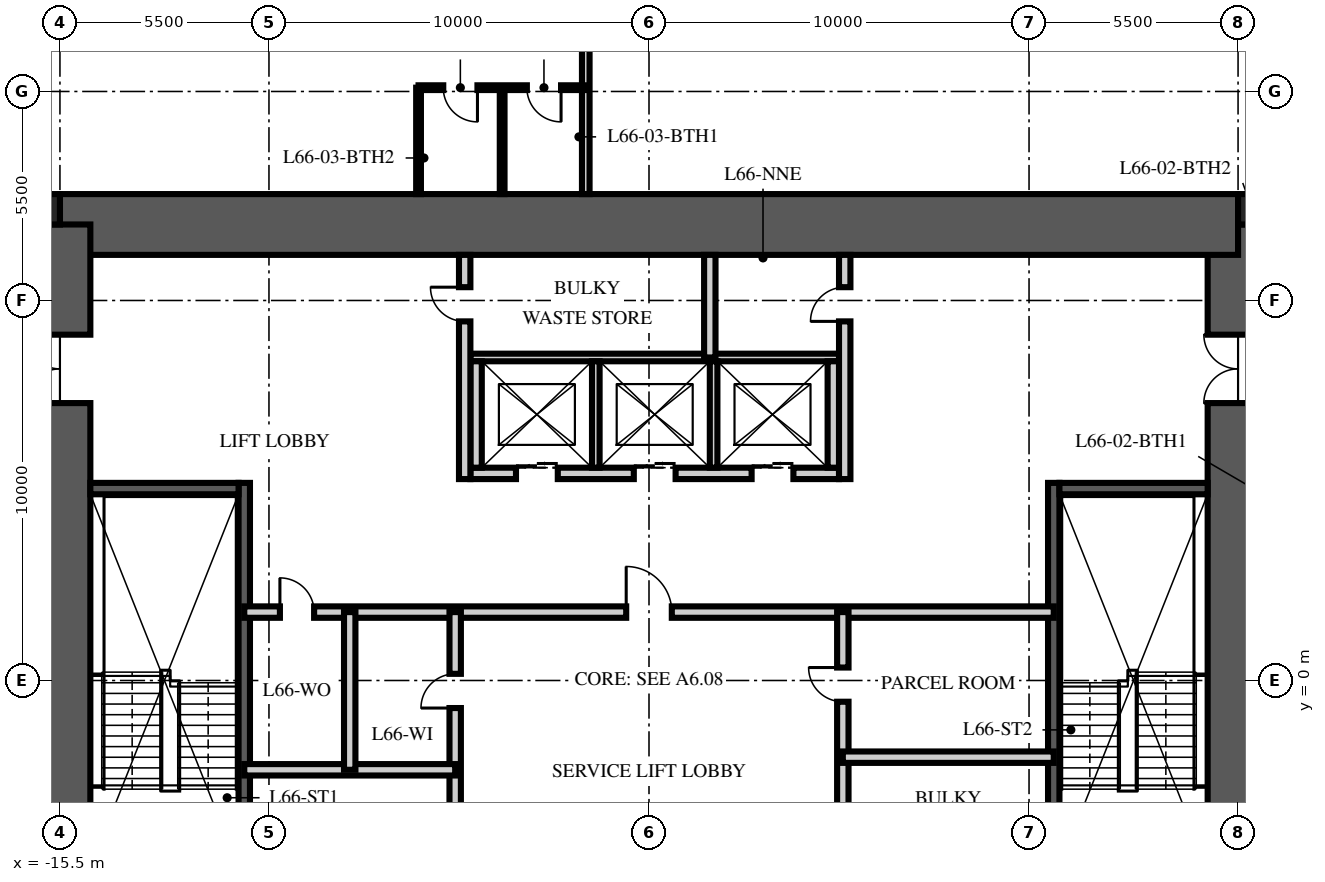
"""IFC4 building model, lengths in metres.
Left out: names, types, materials, properties, quantities, classifications, styles, units other than length and angle.
Written with IfcOpenShell. Run it as: python <this file> out.ifc"""

import sys

from ifc_helpers import new_model, si_unit, direction, frame, frame_2d, origin, origin_2d, place, context, subcontext, project, spatial, rectangle, extrude, element, fill, save


model = new_model("IFC4")
c1 = context("Model", 3, precision=1e-05, world=origin(), true_north=direction((0.0, 1.0)))
c2 = subcontext(c1, "Body", "Model", "MODEL_VIEW")
j1 = project(units=[si_unit("LENGTHUNIT", "METRE"), si_unit("PLANEANGLEUNIT", "RADIAN")], contexts=[c1])
p1 = place(None, origin())
s1 = spatial("IfcSite", under=j1, at=p1, CompositionType="ELEMENT")
p2 = place(p1, origin())
s2 = spatial("IfcBuilding", under=s1, at=p2, CompositionType="ELEMENT")
p3 = place(p2, frame((0.0, 0.0, 263.25)))
s3 = spatial("IfcBuildingStorey", under=s2, at=p3, CompositionType="ELEMENT", Elevation=263.25)
p4 = place(p3, frame((15.5, -12.0, -0.25), z_axis=(0.0, 0.0, 1.0), x_axis=(0.0, 1.0, 0.0)))
e1 = element("IfcWall", 1, at=p4, inside=s3, PredefinedType="SHEAR", context=c2, shape_type="SweptSolid", body=[
    extrude(rectangle(XDim=24.0, YDim=1.6, at=frame_2d((12.0, 0.0))), origin(), (0.0, 0.0, 1.0), 3.75),
])
p5 = place(p4, frame((3.2, 0.0, 0.25)))
e2 = element("IfcOpeningElement", 2, at=p5, cuts=e1, PredefinedType="OPENING", context=c2, shape_type="SweptSolid", body=[
    extrude(rectangle(XDim=1.2, YDim=2.1, at=frame_2d((0.6, 1.05))), frame((0.0, 0.81, 0.0), z_axis=(0.0, -1.0, 0.0), x_axis=(1.0, 0.0, 0.0)), (0.0, 0.0, 1.0), 1.62),
])
p6 = place(p4, frame((19.3, 0.0, 0.25)))
e3 = element("IfcOpeningElement", 3, at=p6, cuts=e1, PredefinedType="OPENING", context=c2, shape_type="SweptSolid", body=[
    extrude(rectangle(XDim=1.8, YDim=2.1, at=frame_2d((0.9, 1.05))), frame((0.0, 0.81, 0.0), z_axis=(0.0, -1.0, 0.0), x_axis=(1.0, 0.0, 0.0)), (0.0, 0.0, 1.0), 1.62),
])
p7 = place(p3, frame((-15.5, 12.0, -0.25), z_axis=(0.0, 0.0, 1.0), x_axis=(1.0, 0.0, 0.0)))
e4 = element("IfcWall", 4, at=p7, inside=s3, PredefinedType="SHEAR", context=c2, shape_type="SweptSolid", body=[
    extrude(rectangle(XDim=31.0, YDim=1.6, at=frame_2d((15.5, 0.0))), origin(), (0.0, 0.0, 1.0), 3.75),
])
p8 = place(p3, frame((-15.5, -12.0, -0.25), z_axis=(0.0, 0.0, 1.0), x_axis=(0.0, 1.0, 0.0)))
e5 = element("IfcWall", 5, at=p8, inside=s3, PredefinedType="SHEAR", context=c2, shape_type="SweptSolid", body=[
    extrude(rectangle(XDim=24.0, YDim=1.6, at=frame_2d((12.0, 0.0))), origin(), (0.0, 0.0, 1.0), 3.75),
])
p9 = place(p8, frame((3.2, 0.0, 0.25)))
e6 = element("IfcOpeningElement", 6, at=p9, cuts=e5, PredefinedType="OPENING", context=c2, shape_type="SweptSolid", body=[
    extrude(rectangle(XDim=1.2, YDim=2.1, at=frame_2d((0.6, 1.05))), frame((0.0, 0.81, 0.0), z_axis=(0.0, -1.0, 0.0), x_axis=(1.0, 0.0, 0.0)), (0.0, 0.0, 1.0), 1.62),
])
p10 = place(p8, frame((19.3, 0.0, 0.25)))
e7 = element("IfcOpeningElement", 7, at=p10, cuts=e5, PredefinedType="OPENING", context=c2, shape_type="SweptSolid", body=[
    extrude(rectangle(XDim=1.8, YDim=2.1, at=frame_2d((0.9, 1.05))), frame((0.0, 0.81, 0.0), z_axis=(0.0, -1.0, 0.0), x_axis=(1.0, 0.0, 0.0)), (0.0, 0.0, 1.0), 1.62),
])
for number, where, z_axis, x_axis in (
    (8, (15.9, 12.4, -0.25), (0.0, 0.0, 1.0), (1.0, 0.0, 0.0)),
    (9, (-15.9, 12.4, -0.25), (0.0, 0.0, 1.0), (1.0, 0.0, 0.0)),
):
    element("IfcColumn", number, at=place(p3, frame(where, z_axis=z_axis, x_axis=x_axis)), inside=s3, PredefinedType="COLUMN", context=c2, shape_type="SweptSolid", body=[
        extrude(rectangle(XDim=0.8, YDim=0.8, at=origin_2d()), origin(), (0.0, 0.0, 1.0), 3.75),
    ])
p11 = place(p3, frame((-10.65, -4.9, 0.0), z_axis=(0.0, 0.0, 1.0), x_axis=(0.0, 1.0, 0.0)))
e10 = element("IfcWall", 10, at=p11, inside=s3, PredefinedType="SOLIDWALL", context=c2, shape_type="SweptSolid", body=[
    extrude(rectangle(XDim=10.1, YDim=0.3, at=frame_2d((5.05, 0.0))), origin(), (0.0, 0.0, 1.0), 3.5),
])
p12 = place(p3, frame((-14.7, 5.05, 0.0), z_axis=(0.0, 0.0, 1.0), x_axis=(1.0, 0.0, 0.0)))
e11 = element("IfcWall", 11, at=p12, inside=s3, PredefinedType="SOLIDWALL", context=c2, shape_type="SweptSolid", body=[
    extrude(rectangle(XDim=3.9, YDim=0.3, at=frame_2d((1.95, 0.0))), origin(), (0.0, 0.0, 1.0), 3.5),
])
p13 = place(p3, frame((10.65, -4.9, 0.0), z_axis=(0.0, 0.0, 1.0), x_axis=(0.0, 1.0, 0.0)))
e12 = element("IfcWall", 12, at=p13, inside=s3, PredefinedType="SOLIDWALL", context=c2, shape_type="SweptSolid", body=[
    extrude(rectangle(XDim=10.1, YDim=0.3, at=frame_2d((5.05, 0.0))), origin(), (0.0, 0.0, 1.0), 3.5),
])
p14 = place(p3, frame((14.7, 5.05, 0.0), z_axis=(0.0, 0.0, 1.0), x_axis=(-1.0, 0.0, 0.0)))
e13 = element("IfcWall", 13, at=p14, inside=s3, PredefinedType="SOLIDWALL", context=c2, shape_type="SweptSolid", body=[
    extrude(rectangle(XDim=3.9, YDim=0.3, at=frame_2d((1.95, 0.0))), origin(), (0.0, 0.0, 1.0), 3.5),
])
p15 = place(p3, frame((-4.7, 5.45, 0.0), z_axis=(0.0, 0.0, 1.0), x_axis=(1.0, 0.0, 0.0)))
e14 = element("IfcWall", 14, at=p15, inside=s3, PredefinedType="PARTITIONING", context=c2, shape_type="SweptSolid", body=[
    extrude(rectangle(XDim=9.7, YDim=0.3, at=frame_2d((4.85, 0.0))), origin(), (0.0, 0.0, 1.0), 3.5),
])
p16 = place(p15, frame((1.2, 0.0, 0.0)))
e15 = element("IfcOpeningElement", 15, at=p16, cuts=e14, PredefinedType="OPENING", context=c2, shape_type="SweptSolid", body=[
    extrude(rectangle(XDim=1.1, YDim=2.1, at=frame_2d((0.55, 1.05))), frame((0.0, 0.16, 0.0), z_axis=(0.0, -1.0, 0.0), x_axis=(1.0, 0.0, 0.0)), (0.0, 0.0, 1.0), 0.32),
])
p17 = place(p15, frame((4.3, 0.0, 0.0)))
e16 = element("IfcOpeningElement", 16, at=p17, cuts=e14, PredefinedType="OPENING", context=c2, shape_type="SweptSolid", body=[
    extrude(rectangle(XDim=1.1, YDim=2.1, at=frame_2d((0.55, 1.05))), frame((0.0, 0.16, 0.0), z_axis=(0.0, -1.0, 0.0), x_axis=(1.0, 0.0, 0.0)), (0.0, 0.0, 1.0), 0.32),
])
p18 = place(p15, frame((7.4, 0.0, 0.0)))
e17 = element("IfcOpeningElement", 17, at=p18, cuts=e14, PredefinedType="OPENING", context=c2, shape_type="SweptSolid", body=[
    extrude(rectangle(XDim=1.1, YDim=2.1, at=frame_2d((0.55, 1.05))), frame((0.0, 0.16, 0.0), z_axis=(0.0, -1.0, 0.0), x_axis=(1.0, 0.0, 0.0)), (0.0, 0.0, 1.0), 0.32),
])
p19 = place(p3, frame((-4.7, 8.5, 0.0), z_axis=(0.0, 0.0, 1.0), x_axis=(1.0, 0.0, 0.0)))
e18 = element("IfcWall", 18, at=p19, inside=s3, PredefinedType="PARTITIONING", context=c2, shape_type="SweptSolid", body=[
    extrude(rectangle(XDim=9.7, YDim=0.2, at=frame_2d((4.85, 0.0))), origin(), (0.0, 0.0, 1.0), 3.5),
])
for number, where, z_axis, x_axis in (
    (19, (-4.55, 5.6, 0.0), (0.0, 0.0, 1.0), (0.0, 1.0, 0.0)),
    (20, (4.85, 5.6, 0.0), (0.0, 0.0, 1.0), (0.0, 1.0, 0.0)),
):
    element("IfcWall", number, at=place(p3, frame(where, z_axis=z_axis, x_axis=x_axis)), inside=s3, PredefinedType="PARTITIONING", context=c2, shape_type="SweptSolid", body=[
        extrude(rectangle(XDim=2.8, YDim=0.3, at=frame_2d((1.4, 0.0))), origin(), (0.0, 0.0, 1.0), 3.5),
    ])
for number, where, z_axis, x_axis in (
    (21, (-1.4, 5.6, 0.0), (0.0, 0.0, 1.0), (0.0, 1.0, 0.0)),
    (22, (1.7, 5.6, 0.0), (0.0, 0.0, 1.0), (0.0, 1.0, 0.0)),
):
    element("IfcWall", number, at=place(p3, frame(where, z_axis=z_axis, x_axis=x_axis)), inside=s3, PredefinedType="PARTITIONING", context=c2, shape_type="SweptSolid", body=[
        extrude(rectangle(XDim=2.8, YDim=0.2, at=frame_2d((1.4, 0.0))), origin(), (0.0, 0.0, 1.0), 3.5),
    ])
p20 = place(p3, frame((-10.65, 1.8, 0.0), z_axis=(0.0, 0.0, 1.0), x_axis=(1.0, 0.0, 0.0)))
e23 = element("IfcWall", 23, at=p20, inside=s3, PredefinedType="PARTITIONING", context=c2, shape_type="SweptSolid", body=[
    extrude(rectangle(XDim=21.3, YDim=0.3, at=frame_2d((10.65, 0.0))), origin(), (0.0, 0.0, 1.0), 3.5),
])
p21 = place(p20, frame((10.05, 0.0, 0.0)))
e24 = element("IfcOpeningElement", 24, at=p21, cuts=e23, PredefinedType="OPENING", context=c2, shape_type="SweptSolid", body=[
    extrude(rectangle(XDim=1.2, YDim=2.1, at=frame_2d((0.6, 1.05))), frame((0.0, 0.16, 0.0), z_axis=(0.0, -1.0, 0.0), x_axis=(1.0, 0.0, 0.0)), (0.0, 0.0, 1.0), 0.32),
])
p22 = place(p20, frame((0.938, 0.0, 0.0)))
e25 = element("IfcOpeningElement", 25, at=p22, cuts=e23, PredefinedType="OPENING", context=c2, shape_type="SweptSolid", body=[
    extrude(rectangle(XDim=0.9, YDim=2.1, at=frame_2d((0.45, 1.05))), frame((0.0, 0.16, 0.0), z_axis=(0.0, -1.0, 0.0), x_axis=(1.0, 0.0, 0.0)), (0.0, 0.0, 1.0), 0.32),
])
p23 = place(p3, frame((-5.1, -6.65, 0.0), z_axis=(0.0, 0.0, 1.0), x_axis=(0.0, 1.0, 0.0)))
e26 = element("IfcWall", 26, at=p23, inside=s3, PredefinedType="PARTITIONING", context=c2, shape_type="SweptSolid", body=[
    extrude(rectangle(XDim=8.45, YDim=0.3, at=frame_2d((4.225, 0.0))), origin(), (0.0, 0.0, 1.0), 3.5),
])
p24 = place(p23, frame((1.7, 0.0, 0.0)))
e27 = element("IfcOpeningElement", 27, at=p24, cuts=e26, PredefinedType="OPENING", context=c2, shape_type="SweptSolid", body=[
    extrude(rectangle(XDim=0.9, YDim=2.1, at=frame_2d((0.45, 1.05))), frame((0.0, 0.16, 0.0), z_axis=(0.0, -1.0, 0.0), x_axis=(1.0, 0.0, 0.0)), (0.0, 0.0, 1.0), 0.32),
])
p25 = place(p23, frame((5.925, 0.0, 0.0)))
e28 = element("IfcOpeningElement", 28, at=p25, cuts=e26, PredefinedType="OPENING", context=c2, shape_type="SweptSolid", body=[
    extrude(rectangle(XDim=0.9, YDim=2.1, at=frame_2d((0.45, 1.05))), frame((0.0, 0.16, 0.0), z_axis=(0.0, -1.0, 0.0), x_axis=(1.0, 0.0, 0.0)), (0.0, 0.0, 1.0), 0.32),
])
p26 = place(p3, frame((5.1, -6.65, 0.0), z_axis=(0.0, 0.0, 1.0), x_axis=(0.0, 1.0, 0.0)))
e29 = element("IfcWall", 29, at=p26, inside=s3, PredefinedType="PARTITIONING", context=c2, shape_type="SweptSolid", body=[
    extrude(rectangle(XDim=8.45, YDim=0.3, at=frame_2d((4.225, 0.0))), origin(), (0.0, 0.0, 1.0), 3.5),
])
p27 = place(p26, frame((1.866, 0.0, 0.0)))
e30 = element("IfcOpeningElement", 30, at=p27, cuts=e29, PredefinedType="OPENING", context=c2, shape_type="SweptSolid", body=[
    extrude(rectangle(XDim=0.9, YDim=2.1, at=frame_2d((0.45, 1.05))), frame((0.0, 0.16, 0.0), z_axis=(0.0, -1.0, 0.0), x_axis=(1.0, 0.0, 0.0)), (0.0, 0.0, 1.0), 0.32),
])
p28 = place(p26, frame((6.091, 0.0, 0.0)))
e31 = element("IfcOpeningElement", 31, at=p28, cuts=e29, PredefinedType="OPENING", context=c2, shape_type="SweptSolid", body=[
    extrude(rectangle(XDim=0.9, YDim=2.1, at=frame_2d((0.45, 1.05))), frame((0.0, 0.16, 0.0), z_axis=(0.0, -1.0, 0.0), x_axis=(1.0, 0.0, 0.0)), (0.0, 0.0, 1.0), 0.32),
])
p29 = place(p3, frame((-10.65, -2.35, 0.0), z_axis=(0.0, 0.0, 1.0), x_axis=(1.0, 0.0, 0.0)))
e32 = element("IfcWall", 32, at=p29, inside=s3, PredefinedType="PARTITIONING", context=c2, shape_type="SweptSolid", body=[
    extrude(rectangle(XDim=5.55, YDim=0.3, at=frame_2d((2.775, 0.0))), origin(), (0.0, 0.0, 1.0), 3.5),
])
p30 = place(p3, frame((-7.875, -2.35, 0.0), z_axis=(0.0, 0.0, 1.0), x_axis=(0.0, 1.0, 0.0)))
e33 = element("IfcWall", 33, at=p30, inside=s3, PredefinedType="PARTITIONING", context=c2, shape_type="SweptSolid", body=[
    extrude(rectangle(XDim=4.15, YDim=0.3, at=frame_2d((2.075, 0.0))), origin(), (0.0, 0.0, 1.0), 3.5),
])
p31 = place(p3, frame((10.65, -2.018, 0.0), z_axis=(0.0, 0.0, 1.0), x_axis=(-1.0, 0.0, 0.0)))
e34 = element("IfcWall", 34, at=p31, inside=s3, PredefinedType="PARTITIONING", context=c2, shape_type="SweptSolid", body=[
    extrude(rectangle(XDim=5.55, YDim=0.3, at=frame_2d((2.775, 0.0))), origin(), (0.0, 0.0, 1.0), 3.5),
])
p32 = place(p3, frame((-4.85, 5.3, 0.0), z_axis=(0.0, 0.0, 1.0), x_axis=(0.0, 1.0, 0.0)))
e35 = element("IfcWall", 35, at=p32, inside=s3, PredefinedType="PARTITIONING", context=c2, shape_type="SweptSolid", body=[
    extrude(rectangle(XDim=5.9, YDim=0.3, at=frame_2d((2.95, 0.0))), origin(), (0.0, 0.0, 1.0), 3.5),
])
p33 = place(p32, frame((4.15, 0.0, 0.0)))
e36 = element("IfcOpeningElement", 36, at=p33, cuts=e35, PredefinedType="OPENING", context=c2, shape_type="SweptSolid", body=[
    extrude(rectangle(XDim=0.9, YDim=2.1, at=frame_2d((0.45, 1.05))), frame((0.0, 0.16, 0.0), z_axis=(0.0, -1.0, 0.0), x_axis=(1.0, 0.0, 0.0)), (0.0, 0.0, 1.0), 0.32),
])
p34 = place(p3, frame((5.15, 5.3, 0.0), z_axis=(0.0, 0.0, 1.0), x_axis=(0.0, 1.0, 0.0)))
e37 = element("IfcWall", 37, at=p34, inside=s3, PredefinedType="PARTITIONING", context=c2, shape_type="SweptSolid", body=[
    extrude(rectangle(XDim=5.9, YDim=0.3, at=frame_2d((2.95, 0.0))), origin(), (0.0, 0.0, 1.0), 3.5),
])
p35 = place(p34, frame((4.15, 0.0, 0.0)))
e38 = element("IfcOpeningElement", 38, at=p35, cuts=e37, PredefinedType="OPENING", context=c2, shape_type="SweptSolid", body=[
    extrude(rectangle(XDim=0.9, YDim=2.1, at=frame_2d((0.45, 1.05))), frame((0.0, 0.16, 0.0), z_axis=(0.0, -1.0, 0.0), x_axis=(1.0, 0.0, 0.0)), (0.0, 0.0, 1.0), 0.32),
])
p36 = place(p3, frame((1.6, 8.5, 0.0), z_axis=(0.0, 0.0, 1.0), x_axis=(0.0, 1.0, 0.0)))
e39 = element("IfcWall", 39, at=p36, inside=s3, PredefinedType="PARTITIONING", context=c2, shape_type="SweptSolid", body=[
    extrude(rectangle(XDim=2.7, YDim=0.3, at=frame_2d((1.35, 0.0))), origin(), (0.0, 0.0, 1.0), 3.5),
])
p37 = place(p3, frame((-1.664, 12.8, 0.0), z_axis=(0.0, 0.0, 1.0), x_axis=(0.0, 1.0, 0.0)))
e40 = element("IfcWall", 40, at=p37, inside=s3, PredefinedType="PARTITIONING", context=c2, shape_type="SweptSolid", body=[
    extrude(rectangle(XDim=12.65, YDim=0.2, at=frame_2d((6.325, 0.0))), origin(), (0.0, 0.0, 1.0), 2.91),
])
p38 = place(p3, frame((-1.664, 15.6, 0.0), z_axis=(0.0, 0.0, 1.0), x_axis=(-1.0, 0.0, 0.0)))
e41 = element("IfcWall", 41, at=p38, inside=s3, PredefinedType="PARTITIONING", context=c2, shape_type="SweptSolid", body=[
    extrude(rectangle(XDim=4.4, YDim=0.125, at=frame_2d((2.2, 0.0))), origin(), (0.0, 0.0, 1.0), 2.81),
])
p39 = place(p38, frame((0.65, 0.0, 0.0)))
e42 = element("IfcOpeningElement", 42, at=p39, cuts=e41, PredefinedType="OPENING", context=c2, shape_type="SweptSolid", body=[
    extrude(rectangle(XDim=0.9, YDim=2.1, at=frame_2d((0.45, 1.05))), frame((0.0, 0.073, 0.0), z_axis=(0.0, -1.0, 0.0), x_axis=(1.0, 0.0, 0.0)), (0.0, 0.0, 1.0), 0.145),
])
p40 = place(p38, frame((2.85, 0.0, 0.0)))
e43 = element("IfcOpeningElement", 43, at=p40, cuts=e41, PredefinedType="OPENING", context=c2, shape_type="SweptSolid", body=[
    extrude(rectangle(XDim=0.9, YDim=2.1, at=frame_2d((0.45, 1.05))), frame((0.0, 0.073, 0.0), z_axis=(0.0, -1.0, 0.0), x_axis=(1.0, 0.0, 0.0)), (0.0, 0.0, 1.0), 0.145),
])
for number, where, z_axis, x_axis in (
    (44, (-3.864, 12.8, 0.0), (0.0, 0.0, 1.0), (0.0, 1.0, 0.0)),
    (45, (-6.064, 12.8, 0.0), (0.0, 0.0, 1.0), (0.0, 1.0, 0.0)),
):
    element("IfcWall", number, at=place(p3, frame(where, z_axis=z_axis, x_axis=x_axis)), inside=s3, PredefinedType="PARTITIONING", context=c2, shape_type="SweptSolid", body=[
        extrude(rectangle(XDim=2.8, YDim=0.125, at=frame_2d((1.4, 0.0))), origin(), (0.0, 0.0, 1.0), 3.5),
    ])
p41 = place(p10, origin())
e46 = element("IfcDoor", 46, at=p41, inside=s3, OperationType="DOUBLE_DOOR_SINGLE_SWING", PredefinedType="DOOR", context=c2, shape_type="SweptSolid", body=[
    extrude(rectangle(XDim=1.8, YDim=2.1, at=frame_2d((0.9, 1.05))), frame((0.0, 0.025, 0.0), z_axis=(0.0, -1.0, 0.0), x_axis=(1.0, 0.0, 0.0)), (0.0, 0.0, 1.0), 0.05),
])
fill(e7, e46)
p42 = place(p6, origin())
e47 = element("IfcDoor", 47, at=p42, inside=s3, OperationType="DOUBLE_DOOR_SINGLE_SWING", PredefinedType="DOOR", context=c2, shape_type="SweptSolid", body=[
    extrude(rectangle(XDim=1.8, YDim=2.1, at=frame_2d((0.9, 1.05))), frame((0.0, 0.025, 0.0), z_axis=(0.0, -1.0, 0.0), x_axis=(1.0, 0.0, 0.0)), (0.0, 0.0, 1.0), 0.05),
])
fill(e3, e47)
p43 = place(p16, origin())
e48 = element("IfcDoor", 48, at=p43, inside=s3, OperationType="DOUBLE_DOOR_SLIDING", PredefinedType="DOOR", context=c2, shape_type="SweptSolid", body=[
    extrude(rectangle(XDim=1.1, YDim=2.1, at=frame_2d((0.55, 1.05))), frame((0.0, 0.025, 0.0), z_axis=(0.0, -1.0, 0.0), x_axis=(1.0, 0.0, 0.0)), (0.0, 0.0, 1.0), 0.05),
])
fill(e15, e48)
p44 = place(p17, origin())
e49 = element("IfcDoor", 49, at=p44, inside=s3, OperationType="DOUBLE_DOOR_SLIDING", PredefinedType="DOOR", context=c2, shape_type="SweptSolid", body=[
    extrude(rectangle(XDim=1.1, YDim=2.1, at=frame_2d((0.55, 1.05))), frame((0.0, 0.025, 0.0), z_axis=(0.0, -1.0, 0.0), x_axis=(1.0, 0.0, 0.0)), (0.0, 0.0, 1.0), 0.05),
])
fill(e16, e49)
p45 = place(p18, origin())
e50 = element("IfcDoor", 50, at=p45, inside=s3, OperationType="DOUBLE_DOOR_SLIDING", PredefinedType="DOOR", context=c2, shape_type="SweptSolid", body=[
    extrude(rectangle(XDim=1.1, YDim=2.1, at=frame_2d((0.55, 1.05))), frame((0.0, 0.025, 0.0), z_axis=(0.0, -1.0, 0.0), x_axis=(1.0, 0.0, 0.0)), (0.0, 0.0, 1.0), 0.05),
])
fill(e17, e50)
p46 = place(p21, origin())
e51 = element("IfcDoor", 51, at=p46, inside=s3, OperationType="SINGLE_SWING_LEFT", PredefinedType="DOOR", context=c2, shape_type="SweptSolid", body=[
    extrude(rectangle(XDim=1.2, YDim=2.1, at=frame_2d((0.6, 1.05))), frame((0.0, 0.025, 0.0), z_axis=(0.0, -1.0, 0.0), x_axis=(1.0, 0.0, 0.0)), (0.0, 0.0, 1.0), 0.05),
])
fill(e24, e51)
p47 = place(p25, origin())
e52 = element("IfcDoor", 52, at=p47, inside=s3, OperationType="SINGLE_SWING_LEFT", PredefinedType="DOOR", context=c2, shape_type="SweptSolid", body=[
    extrude(rectangle(XDim=0.9, YDim=2.1, at=frame_2d((0.45, 1.05))), frame((0.0, 0.025, 0.0), z_axis=(0.0, -1.0, 0.0), x_axis=(1.0, 0.0, 0.0)), (0.0, 0.0, 1.0), 0.05),
])
fill(e28, e52)
p48 = place(p22, origin())
e53 = element("IfcDoor", 53, at=p48, inside=s3, OperationType="SINGLE_SWING_LEFT", PredefinedType="DOOR", context=c2, shape_type="SweptSolid", body=[
    extrude(rectangle(XDim=0.9, YDim=2.1, at=frame_2d((0.45, 1.05))), frame((0.0, 0.025, 0.0), z_axis=(0.0, -1.0, 0.0), x_axis=(1.0, 0.0, 0.0)), (0.0, 0.0, 1.0), 0.05),
])
fill(e25, e53)
p49 = place(p28, origin())
e54 = element("IfcDoor", 54, at=p49, inside=s3, OperationType="SINGLE_SWING_RIGHT", PredefinedType="DOOR", context=c2, shape_type="SweptSolid", body=[
    extrude(rectangle(XDim=0.9, YDim=2.1, at=frame_2d((0.45, 1.05))), frame((0.0, 0.025, 0.0), z_axis=(0.0, -1.0, 0.0), x_axis=(1.0, 0.0, 0.0)), (0.0, 0.0, 1.0), 0.05),
])
fill(e31, e54)
p50 = place(p33, origin())
e55 = element("IfcDoor", 55, at=p50, inside=s3, OperationType="SINGLE_SWING_RIGHT", PredefinedType="DOOR", context=c2, shape_type="SweptSolid", body=[
    extrude(rectangle(XDim=0.9, YDim=2.1, at=frame_2d((0.45, 1.05))), frame((0.0, 0.025, 0.0), z_axis=(0.0, -1.0, 0.0), x_axis=(1.0, 0.0, 0.0)), (0.0, 0.0, 1.0), 0.05),
])
fill(e36, e55)
p51 = place(p35, origin())
e56 = element("IfcDoor", 56, at=p51, inside=s3, OperationType="SINGLE_SWING_LEFT", PredefinedType="DOOR", context=c2, shape_type="SweptSolid", body=[
    extrude(rectangle(XDim=0.9, YDim=2.1, at=frame_2d((0.45, 1.05))), frame((0.0, 0.025, 0.0), z_axis=(0.0, -1.0, 0.0), x_axis=(1.0, 0.0, 0.0)), (0.0, 0.0, 1.0), 0.05),
])
fill(e38, e56)
p52 = place(p39, origin())
e57 = element("IfcDoor", 57, at=p52, inside=s3, OperationType="SINGLE_SWING_LEFT", PredefinedType="DOOR", context=c2, shape_type="SweptSolid", body=[
    extrude(rectangle(XDim=0.9, YDim=2.1, at=frame_2d((0.45, 1.05))), frame((0.0, 0.025, 0.0), z_axis=(0.0, -1.0, 0.0), x_axis=(1.0, 0.0, 0.0)), (0.0, 0.0, 1.0), 0.05),
])
fill(e42, e57)
p53 = place(p40, origin())
e58 = element("IfcDoor", 58, at=p53, inside=s3, OperationType="SINGLE_SWING_LEFT", PredefinedType="DOOR", context=c2, shape_type="SweptSolid", body=[
    extrude(rectangle(XDim=0.9, YDim=2.1, at=frame_2d((0.45, 1.05))), frame((0.0, 0.025, 0.0), z_axis=(0.0, -1.0, 0.0), x_axis=(1.0, 0.0, 0.0)), (0.0, 0.0, 1.0), 0.05),
])
fill(e43, e58)
save(model, sys.argv[1])
